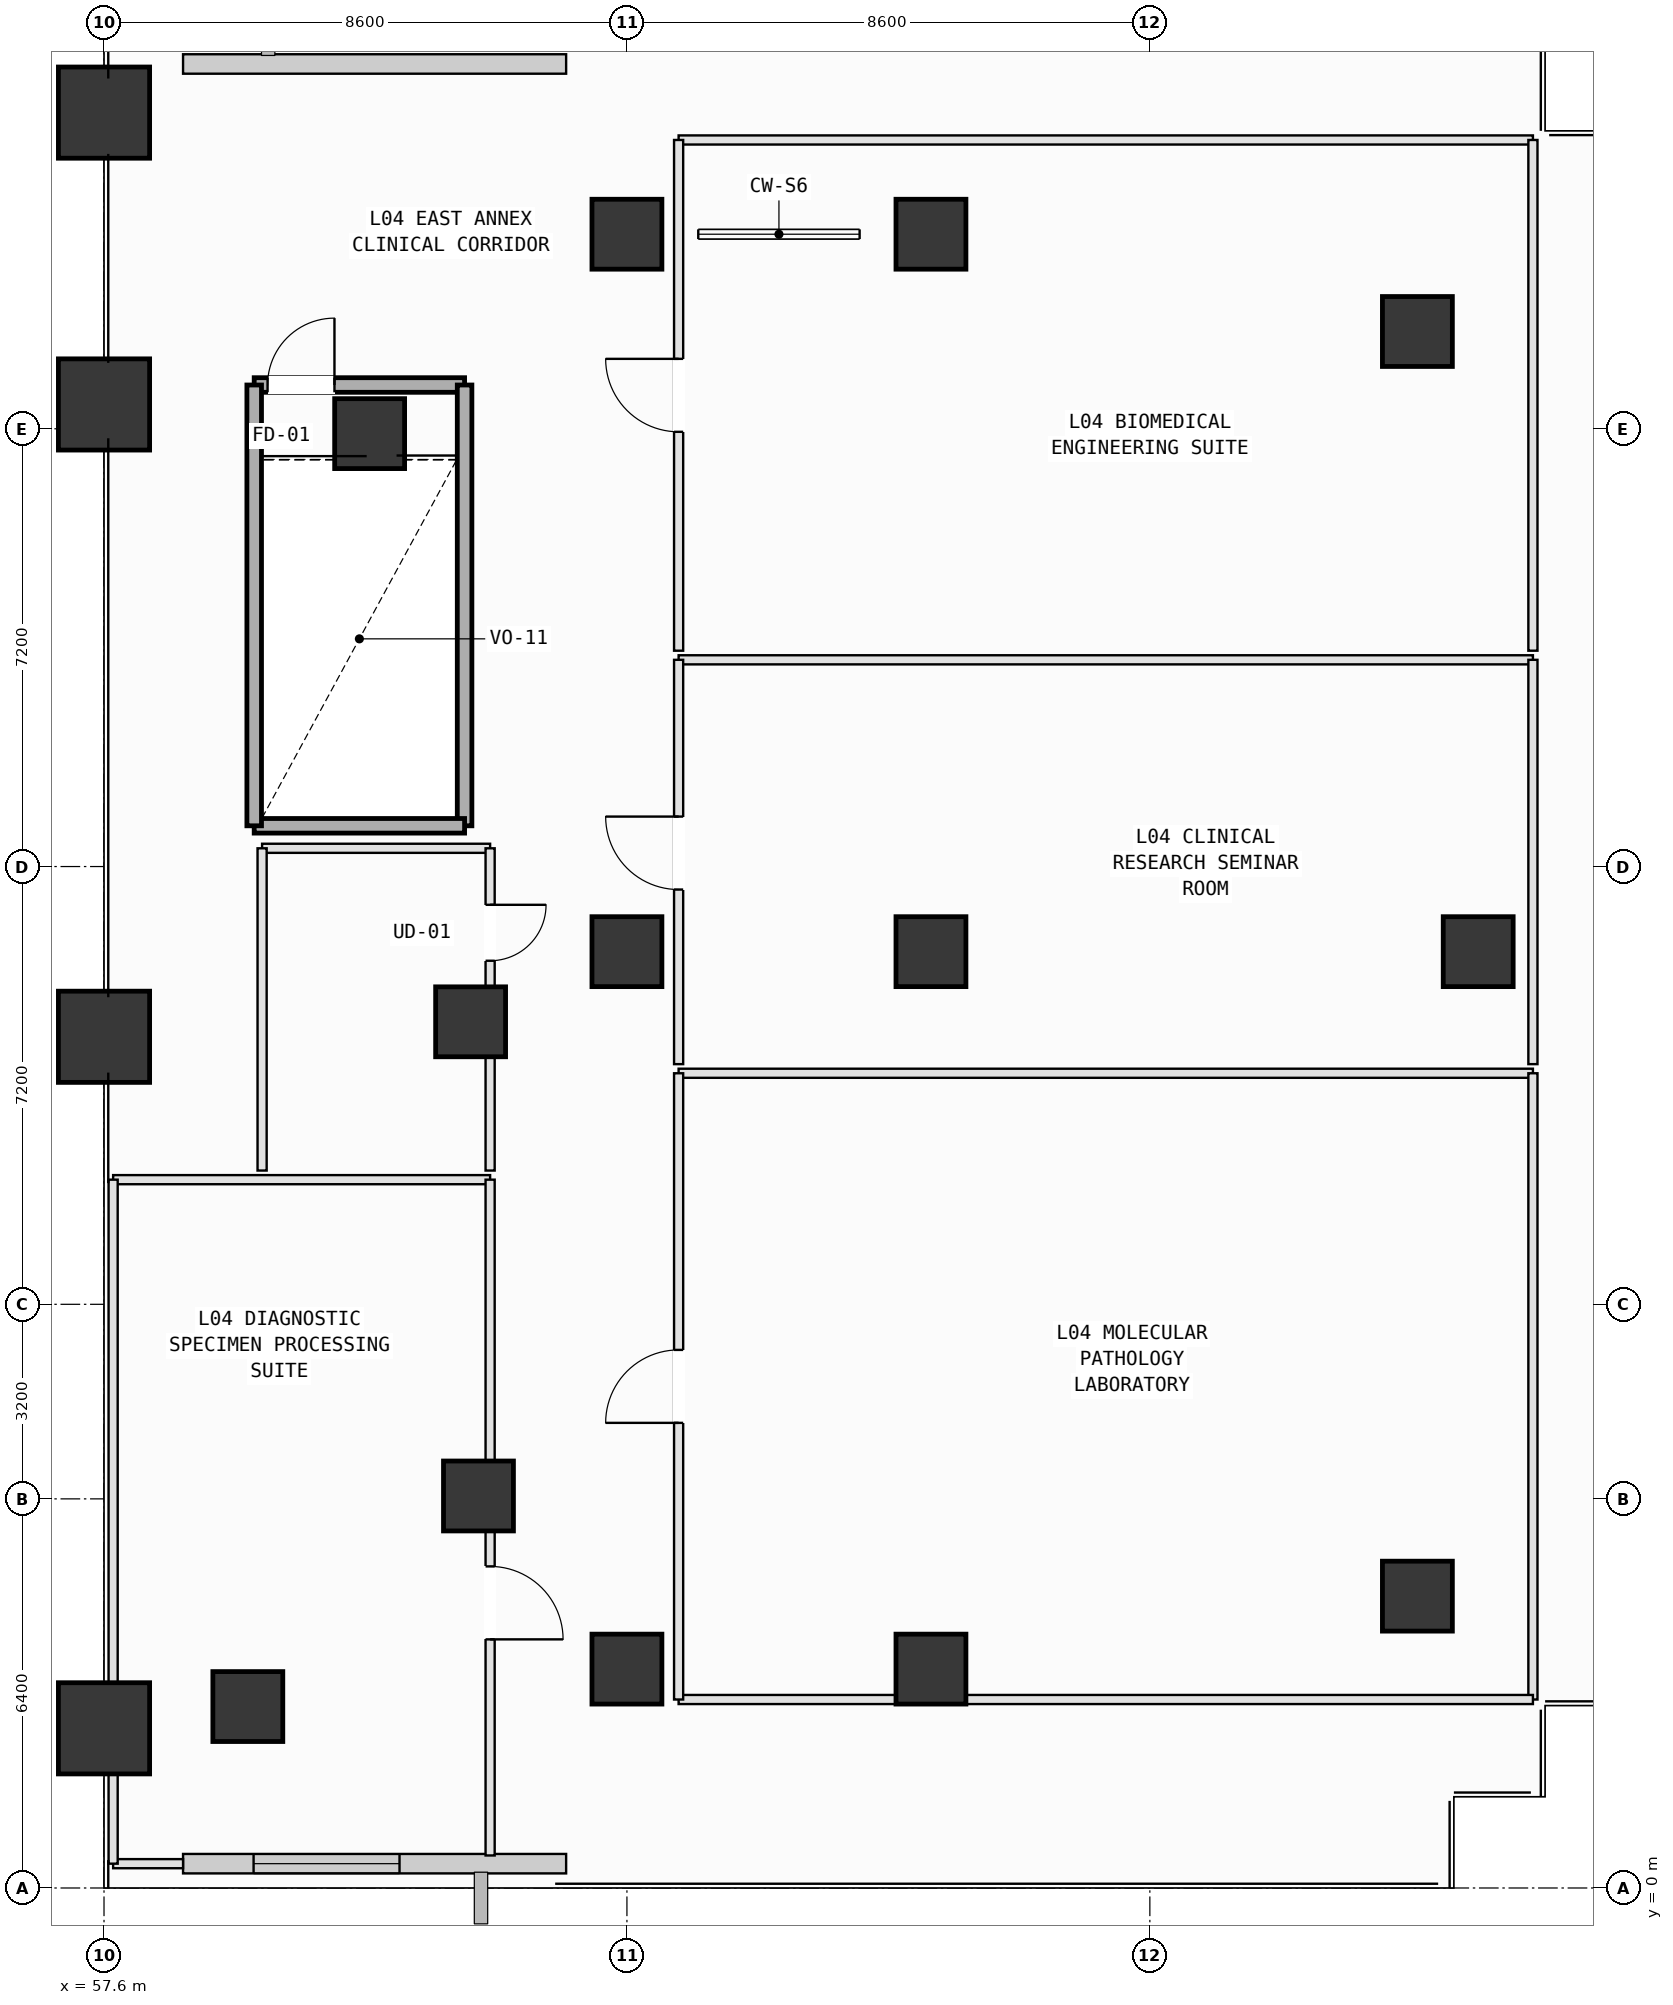
"""IFC4 building model, lengths in metres.
Left out: names, types, materials, properties, quantities, classifications, styles, units other than length and angle.
Written with IfcOpenShell. Run it as: python <this file> out.ifc"""

import sys

from ifc_helpers import new_model, si_unit, direction, frame, frame_2d, origin, origin_2d, place, context, subcontext, project, spatial, rectangle, extrude, element, fill, save


model = new_model("IFC4")
c1 = context("Model", 3, precision=1e-05, world=origin(), true_north=direction((0.0, 1.0)))
c2 = subcontext(c1, "Body", "Model", "MODEL_VIEW")
j1 = project(units=[si_unit("LENGTHUNIT", "METRE"), si_unit("PLANEANGLEUNIT", "RADIAN")], contexts=[c1])
p1 = place(None, origin())
s1 = spatial("IfcSite", under=j1, at=p1, CompositionType="ELEMENT")
p2 = place(p1, origin())
s2 = spatial("IfcBuilding", under=s1, at=p2, CompositionType="ELEMENT")
p3 = place(p2, frame((0.0, 0.0, 21.6)))
s3 = spatial("IfcBuildingStorey", under=s2, at=p3, CompositionType="ELEMENT", Elevation=21.6)
for number, where, z_axis, x_axis in (
    (1, (57.6, 2.626, 0.0), (0.0, 0.0, 1.0), (1.0, 0.0, 0.0)),
    (2, (57.6, 14.0, 0.0), (0.0, 0.0, 1.0), (1.0, 0.0, 0.0)),
    (3, (57.6, 24.4, 0.0), (0.0, 0.0, 1.0), (1.0, 0.0, 0.0)),
    (4, (57.6, 29.2, 0.0), (0.0, 0.0, 1.0), (1.0, 0.0, 0.0)),
):
    element("IfcColumn", number, at=place(p3, frame(where, z_axis=z_axis, x_axis=x_axis)), inside=s3, PredefinedType="PILASTER", context=c2, shape_type="SweptSolid", body=[
        extrude(rectangle(XDim=1.5, YDim=1.5, at=origin_2d()), origin(), (0.0, 0.0, 1.0), 5.4),
    ])
for number, where, z_axis, x_axis in (
    (5, (59.965, 2.984, 0.0), (0.0, 0.0, 1.0), (1.0, 0.0, 0.0)),
    (6, (63.758, 6.448, 0.0), (0.0, 0.0, 1.0), (1.0, 0.0, 0.0)),
    (7, (63.629, 14.246, 0.0), (0.0, 0.0, 1.0), (1.0, 0.0, 0.0)),
    (8, (61.969, 23.92, 0.0), (0.0, 0.0, 1.0), (1.0, 0.0, 0.0)),
    (9, (66.2, 3.6, 0.0), (0.0, 0.0, 1.0), (1.0, 0.0, 0.0)),
    (10, (71.2, 3.6, 0.0), (0.0, 0.0, 1.0), (1.0, 0.0, 0.0)),
    (11, (66.2, 15.4, 0.0), (0.0, 0.0, 1.0), (1.0, 0.0, 0.0)),
    (12, (71.2, 15.4, 0.0), (0.0, 0.0, 1.0), (1.0, 0.0, 0.0)),
    (13, (66.2, 27.2, 0.0), (0.0, 0.0, 1.0), (1.0, 0.0, 0.0)),
    (14, (71.2, 27.2, 0.0), (0.0, 0.0, 1.0), (1.0, 0.0, 0.0)),
    (15, (79.2, 4.8, 0.0), (0.0, 0.0, 1.0), (1.0, 0.0, 0.0)),
    (16, (80.2, 15.4, 0.0), (0.0, 0.0, 1.0), (1.0, 0.0, 0.0)),
    (17, (79.2, 25.6, 0.0), (0.0, 0.0, 1.0), (1.0, 0.0, 0.0)),
):
    element("IfcColumn", number, at=place(p3, frame(where, z_axis=z_axis, x_axis=x_axis)), inside=s3, PredefinedType="COLUMN", context=c2, shape_type="SweptSolid", body=[
        extrude(rectangle(XDim=1.15, YDim=1.15, at=origin_2d()), origin(), (0.0, 0.0, 1.0), 5.4),
    ])
p4 = place(p3, frame((65.2, 0.4, 0.0), z_axis=(0.0, 0.0, 1.0), x_axis=(-1.0, 0.0, 0.0)))
e18 = element("IfcWall", 18, at=p4, inside=s3, PredefinedType="SOLIDWALL", context=c2, shape_type="SweptSolid", body=[
    extrude(rectangle(XDim=6.3, YDim=0.32, at=frame_2d((3.15, 0.0))), origin(), (0.0, 0.0, 1.0), 4.18),
])
p5 = place(p4, frame((2.74, 0.0, 0.8)))
e19 = element("IfcOpeningElement", 19, at=p5, cuts=e18, PredefinedType="OPENING", context=c2, shape_type="SweptSolid", body=[
    extrude(rectangle(XDim=2.4, YDim=2.2, at=frame_2d((1.2, 1.1))), frame((0.0, 0.17, 0.0), z_axis=(0.0, -1.0, 0.0), x_axis=(1.0, 0.0, 0.0)), (0.0, 0.0, 1.0), 0.34),
])
p6 = place(p3, frame((58.9, 30.0, 0.0), z_axis=(0.0, 0.0, 1.0), x_axis=(1.0, 0.0, 0.0)))
e20 = element("IfcWall", 20, at=p6, inside=s3, PredefinedType="SOLIDWALL", context=c2, shape_type="SweptSolid", body=[
    extrude(rectangle(XDim=6.3, YDim=0.32, at=frame_2d((3.15, 0.0))), origin(), (0.0, 0.0, 1.0), 2.685),
])
p7 = place(p3, frame((60.07, 24.72, 0.0), z_axis=(0.0, 0.0, 1.0), x_axis=(1.0, 0.0, 0.0)))
e21 = element("IfcWall", 21, at=p7, inside=s3, PredefinedType="SOLIDWALL", context=c2, shape_type="SweptSolid", body=[
    extrude(rectangle(XDim=3.46, YDim=0.24, at=frame_2d((1.73, 0.0))), origin(), (0.0, 0.0, 1.0), 5.1),
])
p8 = place(p7, frame((0.22, 0.0, 0.0)))
e22 = element("IfcOpeningElement", 22, at=p8, cuts=e21, PredefinedType="OPENING", context=c2, shape_type="SweptSolid", body=[
    extrude(rectangle(XDim=1.1, YDim=2.15, at=frame_2d((0.55, 1.075))), frame((0.0, 0.13, 0.0), z_axis=(0.0, -1.0, 0.0), x_axis=(1.0, 0.0, 0.0)), (0.0, 0.0, 1.0), 0.26),
])
p9 = place(p3, frame((63.53, 24.72, 0.0), z_axis=(0.0, 0.0, 1.0), x_axis=(0.0, -1.0, 0.0)))
e23 = element("IfcWall", 23, at=p9, inside=s3, PredefinedType="SOLIDWALL", context=c2, shape_type="SweptSolid", body=[
    extrude(rectangle(XDim=7.25, YDim=0.24, at=frame_2d((3.625, 0.0))), origin(), (0.0, 0.0, 1.0), 5.1),
])
p10 = place(p3, frame((63.53, 17.47, 0.0), z_axis=(0.0, 0.0, 1.0), x_axis=(-1.0, 0.0, 0.0)))
e24 = element("IfcWall", 24, at=p10, inside=s3, PredefinedType="SOLIDWALL", context=c2, shape_type="SweptSolid", body=[
    extrude(rectangle(XDim=3.46, YDim=0.24, at=frame_2d((1.73, 0.0))), origin(), (0.0, 0.0, 1.0), 5.1),
])
p11 = place(p3, frame((60.07, 17.47, 0.0), z_axis=(0.0, 0.0, 1.0), x_axis=(0.0, 1.0, 0.0)))
e25 = element("IfcWall", 25, at=p11, inside=s3, PredefinedType="SOLIDWALL", context=c2, shape_type="SweptSolid", body=[
    extrude(rectangle(XDim=7.25, YDim=0.24, at=frame_2d((3.625, 0.0))), origin(), (0.0, 0.0, 1.0), 5.1),
])
p12 = place(p3, frame((67.05, 13.4, 0.0), z_axis=(0.0, 0.0, 1.0), x_axis=(1.0, 0.0, 0.0)))
e26 = element("IfcWall", 26, at=p12, inside=s3, PredefinedType="PARTITIONING", context=c2, shape_type="SweptSolid", body=[
    extrude(rectangle(XDim=14.05, YDim=0.15, at=frame_2d((7.025, 0.0))), origin(), (0.0, 0.0, 1.0), 5.1),
])
p13 = place(p3, frame((81.1, 13.4, 0.0), z_axis=(0.0, 0.0, 1.0), x_axis=(0.0, -1.0, 0.0)))
e27 = element("IfcWall", 27, at=p13, inside=s3, PredefinedType="PARTITIONING", context=c2, shape_type="SweptSolid", body=[
    extrude(rectangle(XDim=10.3, YDim=0.15, at=frame_2d((5.15, 0.0))), origin(), (0.0, 0.0, 1.0), 2.685),
])
p14 = place(p3, frame((81.1, 3.1, 0.0), z_axis=(0.0, 0.0, 1.0), x_axis=(-1.0, 0.0, 0.0)))
e28 = element("IfcWall", 28, at=p14, inside=s3, PredefinedType="PARTITIONING", context=c2, shape_type="SweptSolid", body=[
    extrude(rectangle(XDim=14.05, YDim=0.15, at=frame_2d((7.025, 0.0))), origin(), (0.0, 0.0, 1.0), 2.685),
])
p15 = place(p3, frame((67.05, 3.1, 0.0), z_axis=(0.0, 0.0, 1.0), x_axis=(0.0, 1.0, 0.0)))
e29 = element("IfcWall", 29, at=p15, inside=s3, PredefinedType="PARTITIONING", context=c2, shape_type="SweptSolid", body=[
    extrude(rectangle(XDim=10.3, YDim=0.15, at=frame_2d((5.15, 0.0))), origin(), (0.0, 0.0, 1.0), 3.485),
])
p16 = place(p15, frame((4.55, 0.0, 0.0)))
e30 = element("IfcOpeningElement", 30, at=p16, cuts=e29, PredefinedType="OPENING", context=c2, shape_type="SweptSolid", body=[
    extrude(rectangle(XDim=1.2, YDim=2.15, at=frame_2d((0.6, 1.075))), frame((0.0, 0.085, 0.0), z_axis=(0.0, -1.0, 0.0), x_axis=(1.0, 0.0, 0.0)), (0.0, 0.0, 1.0), 0.17),
])
p17 = place(p3, frame((67.05, 20.2, 0.0), z_axis=(0.0, 0.0, 1.0), x_axis=(1.0, 0.0, 0.0)))
e31 = element("IfcWall", 31, at=p17, inside=s3, PredefinedType="PARTITIONING", context=c2, shape_type="SweptSolid", body=[
    extrude(rectangle(XDim=14.05, YDim=0.15, at=frame_2d((7.025, 0.0))), origin(), (0.0, 0.0, 1.0), 5.1),
])
p18 = place(p3, frame((81.1, 20.2, 0.0), z_axis=(0.0, 0.0, 1.0), x_axis=(0.0, -1.0, 0.0)))
e32 = element("IfcWall", 32, at=p18, inside=s3, PredefinedType="PARTITIONING", context=c2, shape_type="SweptSolid", body=[
    extrude(rectangle(XDim=6.65, YDim=0.15, at=frame_2d((3.325, 0.0))), origin(), (0.0, 0.0, 1.0), 2.685),
])
p19 = place(p3, frame((67.05, 13.55, 0.0), z_axis=(0.0, 0.0, 1.0), x_axis=(0.0, 1.0, 0.0)))
e33 = element("IfcWall", 33, at=p19, inside=s3, PredefinedType="PARTITIONING", context=c2, shape_type="SweptSolid", body=[
    extrude(rectangle(XDim=6.65, YDim=0.15, at=frame_2d((3.325, 0.0))), origin(), (0.0, 0.0, 1.0), 2.685),
])
p20 = place(p19, frame((2.872, 0.0, 0.0)))
e34 = element("IfcOpeningElement", 34, at=p20, cuts=e33, PredefinedType="OPENING", context=c2, shape_type="SweptSolid", body=[
    extrude(rectangle(XDim=1.2, YDim=2.15, at=frame_2d((0.6, 1.075))), frame((0.0, 0.085, 0.0), z_axis=(0.0, -1.0, 0.0), x_axis=(1.0, 0.0, 0.0)), (0.0, 0.0, 1.0), 0.17),
])
p21 = place(p3, frame((67.05, 28.75, 0.0), z_axis=(0.0, 0.0, 1.0), x_axis=(1.0, 0.0, 0.0)))
e35 = element("IfcWall", 35, at=p21, inside=s3, PredefinedType="PARTITIONING", context=c2, shape_type="SweptSolid", body=[
    extrude(rectangle(XDim=14.05, YDim=0.15, at=frame_2d((7.025, 0.0))), origin(), (0.0, 0.0, 1.0), 5.1),
])
p22 = place(p3, frame((81.1, 28.75, 0.0), z_axis=(0.0, 0.0, 1.0), x_axis=(0.0, -1.0, 0.0)))
e36 = element("IfcWall", 36, at=p22, inside=s3, PredefinedType="PARTITIONING", context=c2, shape_type="SweptSolid", body=[
    extrude(rectangle(XDim=8.4, YDim=0.15, at=frame_2d((4.2, 0.0))), origin(), (0.0, 0.0, 1.0), 5.1),
])
p23 = place(p3, frame((67.05, 20.35, 0.0), z_axis=(0.0, 0.0, 1.0), x_axis=(0.0, 1.0, 0.0)))
e37 = element("IfcWall", 37, at=p23, inside=s3, PredefinedType="PARTITIONING", context=c2, shape_type="SweptSolid", body=[
    extrude(rectangle(XDim=8.4, YDim=0.15, at=frame_2d((4.2, 0.0))), origin(), (0.0, 0.0, 1.0), 3.485),
])
p24 = place(p23, frame((3.6, 0.0, 0.0)))
e38 = element("IfcOpeningElement", 38, at=p24, cuts=e37, PredefinedType="OPENING", context=c2, shape_type="SweptSolid", body=[
    extrude(rectangle(XDim=1.2, YDim=2.15, at=frame_2d((0.6, 1.075))), frame((0.0, 0.085, 0.0), z_axis=(0.0, -1.0, 0.0), x_axis=(1.0, 0.0, 0.0)), (0.0, 0.0, 1.0), 0.17),
])
p25 = place(p3, frame((57.75, 11.65, 0.0), z_axis=(0.0, 0.0, 1.0), x_axis=(1.0, 0.0, 0.0)))
e39 = element("IfcWall", 39, at=p25, inside=s3, PredefinedType="PARTITIONING", context=c2, shape_type="SweptSolid", body=[
    extrude(rectangle(XDim=6.2, YDim=0.15, at=frame_2d((3.1, 0.0))), origin(), (0.0, 0.0, 1.0), 5.1),
])
p26 = place(p3, frame((63.95, 11.65, 0.0), z_axis=(0.0, 0.0, 1.0), x_axis=(0.0, -1.0, 0.0)))
e40 = element("IfcWall", 40, at=p26, inside=s3, PredefinedType="PARTITIONING", context=c2, shape_type="SweptSolid", body=[
    extrude(rectangle(XDim=11.115, YDim=0.15, at=frame_2d((5.558, 0.0))), origin(), (0.0, 0.0, 1.0), 2.685),
])
p27 = place(p26, frame((6.361, 0.0, 0.0)))
e41 = element("IfcOpeningElement", 41, at=p27, cuts=e40, PredefinedType="OPENING", context=c2, shape_type="SweptSolid", body=[
    extrude(rectangle(XDim=1.2, YDim=2.15, at=frame_2d((0.6, 1.075))), frame((0.0, 0.085, 0.0), z_axis=(0.0, -1.0, 0.0), x_axis=(1.0, 0.0, 0.0)), (0.0, 0.0, 1.0), 0.17),
])
p28 = place(p3, frame((58.9, 0.4, 0.0), z_axis=(0.0, 0.0, 1.0), x_axis=(-1.0, 0.0, 0.0)))
e42 = element("IfcWall", 42, at=p28, inside=s3, PredefinedType="PARTITIONING", context=c2, shape_type="SweptSolid", body=[
    extrude(rectangle(XDim=1.15, YDim=0.15, at=frame_2d((0.575, 0.0))), origin(), (0.0, 0.0, 1.0), 5.1),
])
p29 = place(p3, frame((57.75, 0.4, 0.0), z_axis=(0.0, 0.0, 1.0), x_axis=(0.0, 1.0, 0.0)))
e43 = element("IfcWall", 43, at=p29, inside=s3, PredefinedType="PARTITIONING", context=c2, shape_type="SweptSolid", body=[
    extrude(rectangle(XDim=11.25, YDim=0.15, at=frame_2d((5.625, 0.0))), origin(), (0.0, 0.0, 1.0), 2.685),
])
p30 = place(p3, frame((60.2, 17.1, 0.0), z_axis=(0.0, 0.0, 1.0), x_axis=(1.0, 0.0, 0.0)))
e44 = element("IfcWall", 44, at=p30, inside=s3, PredefinedType="PARTITIONING", context=c2, shape_type="SweptSolid", body=[
    extrude(rectangle(XDim=3.75, YDim=0.15, at=frame_2d((1.875, 0.0))), origin(), (0.0, 0.0, 1.0), 5.1),
])
p31 = place(p3, frame((63.95, 17.1, 0.0), z_axis=(0.0, 0.0, 1.0), x_axis=(0.0, -1.0, 0.0)))
e45 = element("IfcWall", 45, at=p31, inside=s3, PredefinedType="PARTITIONING", context=c2, shape_type="SweptSolid", body=[
    extrude(rectangle(XDim=5.3, YDim=0.15, at=frame_2d((2.65, 0.0))), origin(), (0.0, 0.0, 1.0), 2.685),
])
p32 = place(p31, frame((0.929, 0.0, 0.0)))
e46 = element("IfcOpeningElement", 46, at=p32, cuts=e45, PredefinedType="OPENING", context=c2, shape_type="SweptSolid", body=[
    extrude(rectangle(XDim=0.92, YDim=2.1, at=frame_2d((0.46, 1.05))), frame((0.0, 0.085, 0.0), z_axis=(0.0, -1.0, 0.0), x_axis=(1.0, 0.0, 0.0)), (0.0, 0.0, 1.0), 0.17),
])
p33 = place(p3, frame((60.2, 11.8, 0.0), z_axis=(0.0, 0.0, 1.0), x_axis=(0.0, 1.0, 0.0)))
e47 = element("IfcWall", 47, at=p33, inside=s3, PredefinedType="PARTITIONING", context=c2, shape_type="SweptSolid", body=[
    extrude(rectangle(XDim=5.3, YDim=0.15, at=frame_2d((2.65, 0.0))), origin(), (0.0, 0.0, 1.0), 5.1),
])
p34 = place(p5, origin())
e48 = element("IfcWindow", 48, at=p34, inside=s3, PartitioningType="SINGLE_PANEL", PredefinedType="WINDOW", context=c2, shape_type="SweptSolid", body=[
    extrude(rectangle(XDim=2.4, YDim=2.2, at=frame_2d((1.2, 1.1))), frame((0.0, 0.03, 0.0), z_axis=(0.0, -1.0, 0.0), x_axis=(1.0, 0.0, 0.0)), (0.0, 0.0, 1.0), 0.06),
])
fill(e19, e48)
p35 = place(p8, origin())
e49 = element("IfcDoor", 49, at=p35, inside=s3, OperationType="SINGLE_SWING_RIGHT", PredefinedType="DOOR", context=c2, shape_type="SweptSolid", body=[
    extrude(rectangle(XDim=1.1, YDim=2.15, at=frame_2d((0.55, 1.075))), frame((0.0, 0.025, 0.0), z_axis=(0.0, -1.0, 0.0), x_axis=(1.0, 0.0, 0.0)), (0.0, 0.0, 1.0), 0.05),
])
fill(e22, e49)
p36 = place(p16, origin())
e50 = element("IfcDoor", 50, at=p36, inside=s3, OperationType="SINGLE_SWING_LEFT", PredefinedType="DOOR", context=c2, shape_type="SweptSolid", body=[
    extrude(rectangle(XDim=1.2, YDim=2.15, at=frame_2d((0.6, 1.075))), frame((0.0, 0.025, 0.0), z_axis=(0.0, -1.0, 0.0), x_axis=(1.0, 0.0, 0.0)), (0.0, 0.0, 1.0), 0.05),
])
fill(e30, e50)
p37 = place(p20, origin())
e51 = element("IfcDoor", 51, at=p37, inside=s3, OperationType="SINGLE_SWING_RIGHT", PredefinedType="DOOR", context=c2, shape_type="SweptSolid", body=[
    extrude(rectangle(XDim=1.2, YDim=2.15, at=frame_2d((0.6, 1.075))), frame((0.0, 0.025, 0.0), z_axis=(0.0, -1.0, 0.0), x_axis=(1.0, 0.0, 0.0)), (0.0, 0.0, 1.0), 0.05),
])
fill(e34, e51)
p38 = place(p24, origin())
e52 = element("IfcDoor", 52, at=p38, inside=s3, OperationType="SINGLE_SWING_RIGHT", PredefinedType="DOOR", context=c2, shape_type="SweptSolid", body=[
    extrude(rectangle(XDim=1.2, YDim=2.15, at=frame_2d((0.6, 1.075))), frame((0.0, 0.025, 0.0), z_axis=(0.0, -1.0, 0.0), x_axis=(1.0, 0.0, 0.0)), (0.0, 0.0, 1.0), 0.05),
])
fill(e38, e52)
p39 = place(p27, origin())
e53 = element("IfcDoor", 53, at=p39, inside=s3, OperationType="SINGLE_SWING_RIGHT", PredefinedType="DOOR", context=c2, shape_type="SweptSolid", body=[
    extrude(rectangle(XDim=1.2, YDim=2.15, at=frame_2d((0.6, 1.075))), frame((0.0, 0.025, 0.0), z_axis=(0.0, -1.0, 0.0), x_axis=(1.0, 0.0, 0.0)), (0.0, 0.0, 1.0), 0.05),
])
fill(e41, e53)
p40 = place(p32, origin())
e54 = element("IfcDoor", 54, at=p40, inside=s3, OperationType="SINGLE_SWING_LEFT", PredefinedType="DOOR", context=c2, shape_type="SweptSolid", body=[
    extrude(rectangle(XDim=0.92, YDim=2.1, at=frame_2d((0.46, 1.05))), frame((0.0, 0.025, 0.0), z_axis=(0.0, -1.0, 0.0), x_axis=(1.0, 0.0, 0.0)), (0.0, 0.0, 1.0), 0.05),
])
fill(e46, e54)
save(model, sys.argv[1])
